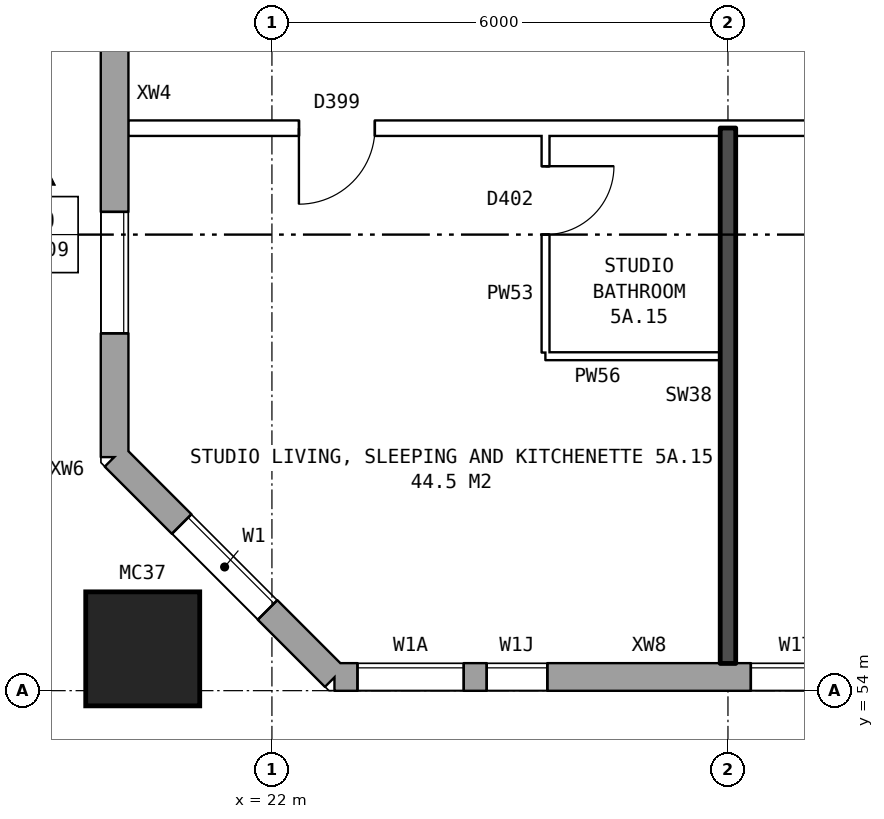
"""IFC4 building model, lengths in metres.
Left out: names, types, materials, properties, quantities, classifications, styles, units other than length and angle.
Written with IfcOpenShell. Run it as: python <this file> out.ifc"""

import sys

from ifc_helpers import new_model, si_unit, direction, frame, frame_2d, origin, origin_2d, place, context, subcontext, project, spatial, rectangle, hollow_rectangle, extrude, element, fill, save


model = new_model("IFC4")
c1 = context("Model", 3, precision=1e-05, world=origin(), true_north=direction((0.0, 1.0)))
c2 = subcontext(c1, "Body", "Model", "MODEL_VIEW")
j1 = project(units=[si_unit("LENGTHUNIT", "METRE"), si_unit("PLANEANGLEUNIT", "RADIAN")], contexts=[c1])
p1 = place(None, origin())
s1 = spatial("IfcSite", under=j1, at=p1, CompositionType="ELEMENT")
p2 = place(p1, origin())
s2 = spatial("IfcBuilding", under=s1, at=p2, CompositionType="ELEMENT")
p3 = place(p2, frame((0.0, 0.0, 22.6)))
s3 = spatial("IfcBuildingStorey", under=s2, at=p3, CompositionType="ELEMENT", Elevation=22.6)
p4 = place(p3, frame((20.3, 54.55, 0.0), z_axis=(0.0, 0.0, 1.0), x_axis=(1.0, 0.0, 0.0)))
e1 = element("IfcColumn", 1, at=p4, inside=s3, PredefinedType="COLUMN", context=c2, shape_type="SweptSolid", body=[
    extrude(hollow_rectangle(XDim=1.5, YDim=1.5, WallThickness=0.08, at=origin_2d()), origin(), (0.0, 0.0, 1.0), 3.1),
])
p5 = place(p3, frame((19.93, 57.075, 0.0), z_axis=(0.0, 0.0, 1.0), x_axis=(0.707106781187, -0.707106781187, 0.0)))
e2 = element("IfcWall", 2, at=p5, inside=s3, PredefinedType="STANDARD", context=c2, shape_type="SweptSolid", body=[
    extrude(rectangle(XDim=4.094, YDim=0.36, at=frame_2d((2.047, 0.0))), origin(), (0.0, 0.0, 1.0), 2.85),
])
p6 = place(p5, frame((1.247, 0.0, 0.8)))
e3 = element("IfcOpeningElement", 3, at=p6, cuts=e2, PredefinedType="OPENING", context=c2, shape_type="SweptSolid", body=[
    extrude(rectangle(XDim=1.6, YDim=1.8, at=frame_2d((0.8, 0.9))), frame((0.0, 0.19, 0.0), z_axis=(0.0, -1.0, 0.0), x_axis=(1.0, 0.0, 0.0)), (0.0, 0.0, 1.0), 0.38),
])
p7 = place(p3, frame((22.825, 54.18, 0.0), z_axis=(0.0, 0.0, 1.0), x_axis=(1.0, 0.0, 0.0)))
e4 = element("IfcWall", 4, at=p7, inside=s3, PredefinedType="STANDARD", context=c2, shape_type="SweptSolid", body=[
    extrude(rectangle(XDim=50.101, YDim=0.36, at=frame_2d((25.05, 0.0))), origin(), (0.0, 0.0, 1.0), 2.85),
])
p8 = place(p7, frame((0.3, 0.0, 0.8)))
e5 = element("IfcOpeningElement", 5, at=p8, cuts=e4, PredefinedType="OPENING", context=c2, shape_type="SweptSolid", body=[
    extrude(rectangle(XDim=1.4, YDim=1.8, at=frame_2d((0.7, 0.9))), frame((0.0, 0.19, 0.0), z_axis=(0.0, -1.0, 0.0), x_axis=(1.0, 0.0, 0.0)), (0.0, 0.0, 1.0), 0.38),
])
p9 = place(p7, frame((5.475, 0.0, 0.8)))
e6 = element("IfcOpeningElement", 6, at=p9, cuts=e4, PredefinedType="OPENING", context=c2, shape_type="SweptSolid", body=[
    extrude(rectangle(XDim=1.2, YDim=0.9, at=frame_2d((0.6, 0.45))), frame((0.0, 0.19, 0.0), z_axis=(0.0, -1.0, 0.0), x_axis=(1.0, 0.0, 0.0)), (0.0, 0.0, 1.0), 0.38),
])
p10 = place(p7, frame((8.875, 0.0, 0.8)))
e7 = element("IfcOpeningElement", 7, at=p10, cuts=e4, PredefinedType="OPENING", context=c2, shape_type="SweptSolid", body=[
    extrude(rectangle(XDim=1.6, YDim=1.8, at=frame_2d((0.8, 0.9))), frame((0.0, 0.19, 0.0), z_axis=(0.0, -1.0, 0.0), x_axis=(1.0, 0.0, 0.0)), (0.0, 0.0, 1.0), 0.38),
])
p11 = place(p7, frame((11.875, 0.0, 0.8)))
e8 = element("IfcOpeningElement", 8, at=p11, cuts=e4, PredefinedType="OPENING", context=c2, shape_type="SweptSolid", body=[
    extrude(rectangle(XDim=1.6, YDim=1.8, at=frame_2d((0.8, 0.9))), frame((0.0, 0.19, 0.0), z_axis=(0.0, -1.0, 0.0), x_axis=(1.0, 0.0, 0.0)), (0.0, 0.0, 1.0), 0.38),
])
p12 = place(p7, frame((14.875, 0.0, 0.8)))
e9 = element("IfcOpeningElement", 9, at=p12, cuts=e4, PredefinedType="OPENING", context=c2, shape_type="SweptSolid", body=[
    extrude(rectangle(XDim=1.6, YDim=1.8, at=frame_2d((0.8, 0.9))), frame((0.0, 0.19, 0.0), z_axis=(0.0, -1.0, 0.0), x_axis=(1.0, 0.0, 0.0)), (0.0, 0.0, 1.0), 0.38),
])
p13 = place(p7, frame((17.875, 0.0, 0.8)))
e10 = element("IfcOpeningElement", 10, at=p13, cuts=e4, PredefinedType="OPENING", context=c2, shape_type="SweptSolid", body=[
    extrude(rectangle(XDim=1.6, YDim=1.8, at=frame_2d((0.8, 0.9))), frame((0.0, 0.19, 0.0), z_axis=(0.0, -1.0, 0.0), x_axis=(1.0, 0.0, 0.0)), (0.0, 0.0, 1.0), 0.38),
])
p14 = place(p7, frame((20.875, 0.0, 0.8)))
e11 = element("IfcOpeningElement", 11, at=p14, cuts=e4, PredefinedType="OPENING", context=c2, shape_type="SweptSolid", body=[
    extrude(rectangle(XDim=1.6, YDim=1.8, at=frame_2d((0.8, 0.9))), frame((0.0, 0.19, 0.0), z_axis=(0.0, -1.0, 0.0), x_axis=(1.0, 0.0, 0.0)), (0.0, 0.0, 1.0), 0.38),
])
p15 = place(p7, frame((23.875, 0.0, 0.8)))
e12 = element("IfcOpeningElement", 12, at=p15, cuts=e4, PredefinedType="OPENING", context=c2, shape_type="SweptSolid", body=[
    extrude(rectangle(XDim=1.6, YDim=1.8, at=frame_2d((0.8, 0.9))), frame((0.0, 0.19, 0.0), z_axis=(0.0, -1.0, 0.0), x_axis=(1.0, 0.0, 0.0)), (0.0, 0.0, 1.0), 0.38),
])
p16 = place(p7, frame((26.875, 0.0, 0.8)))
e13 = element("IfcOpeningElement", 13, at=p16, cuts=e4, PredefinedType="OPENING", context=c2, shape_type="SweptSolid", body=[
    extrude(rectangle(XDim=1.6, YDim=1.8, at=frame_2d((0.8, 0.9))), frame((0.0, 0.19, 0.0), z_axis=(0.0, -1.0, 0.0), x_axis=(1.0, 0.0, 0.0)), (0.0, 0.0, 1.0), 0.38),
])
p17 = place(p7, frame((29.875, 0.0, 0.8)))
e14 = element("IfcOpeningElement", 14, at=p17, cuts=e4, PredefinedType="OPENING", context=c2, shape_type="SweptSolid", body=[
    extrude(rectangle(XDim=1.6, YDim=1.8, at=frame_2d((0.8, 0.9))), frame((0.0, 0.19, 0.0), z_axis=(0.0, -1.0, 0.0), x_axis=(1.0, 0.0, 0.0)), (0.0, 0.0, 1.0), 0.38),
])
p18 = place(p7, frame((32.875, 0.0, 0.8)))
e15 = element("IfcOpeningElement", 15, at=p18, cuts=e4, PredefinedType="OPENING", context=c2, shape_type="SweptSolid", body=[
    extrude(rectangle(XDim=1.6, YDim=1.8, at=frame_2d((0.8, 0.9))), frame((0.0, 0.19, 0.0), z_axis=(0.0, -1.0, 0.0), x_axis=(1.0, 0.0, 0.0)), (0.0, 0.0, 1.0), 0.38),
])
p19 = place(p7, frame((35.875, 0.0, 0.8)))
e16 = element("IfcOpeningElement", 16, at=p19, cuts=e4, PredefinedType="OPENING", context=c2, shape_type="SweptSolid", body=[
    extrude(rectangle(XDim=1.6, YDim=1.8, at=frame_2d((0.8, 0.9))), frame((0.0, 0.19, 0.0), z_axis=(0.0, -1.0, 0.0), x_axis=(1.0, 0.0, 0.0)), (0.0, 0.0, 1.0), 0.38),
])
p20 = place(p7, frame((38.875, 0.0, 0.8)))
e17 = element("IfcOpeningElement", 17, at=p20, cuts=e4, PredefinedType="OPENING", context=c2, shape_type="SweptSolid", body=[
    extrude(rectangle(XDim=1.6, YDim=1.8, at=frame_2d((0.8, 0.9))), frame((0.0, 0.19, 0.0), z_axis=(0.0, -1.0, 0.0), x_axis=(1.0, 0.0, 0.0)), (0.0, 0.0, 1.0), 0.38),
])
p21 = place(p7, frame((41.875, 0.0, 0.8)))
e18 = element("IfcOpeningElement", 18, at=p21, cuts=e4, PredefinedType="OPENING", context=c2, shape_type="SweptSolid", body=[
    extrude(rectangle(XDim=1.6, YDim=1.8, at=frame_2d((0.8, 0.9))), frame((0.0, 0.19, 0.0), z_axis=(0.0, -1.0, 0.0), x_axis=(1.0, 0.0, 0.0)), (0.0, 0.0, 1.0), 0.38),
])
p22 = place(p7, frame((43.775, 0.0, 0.8)))
e19 = element("IfcOpeningElement", 19, at=p22, cuts=e4, PredefinedType="OPENING", context=c2, shape_type="SweptSolid", body=[
    extrude(rectangle(XDim=0.8, YDim=0.9, at=frame_2d((0.4, 0.45))), frame((0.0, 0.19, 0.0), z_axis=(0.0, -1.0, 0.0), x_axis=(1.0, 0.0, 0.0)), (0.0, 0.0, 1.0), 0.38),
])
p23 = place(p7, frame((47.875, 0.0, 0.8)))
e20 = element("IfcOpeningElement", 20, at=p23, cuts=e4, PredefinedType="OPENING", context=c2, shape_type="SweptSolid", body=[
    extrude(rectangle(XDim=1.6, YDim=1.8, at=frame_2d((0.8, 0.9))), frame((0.0, 0.19, 0.0), z_axis=(0.0, -1.0, 0.0), x_axis=(1.0, 0.0, 0.0)), (0.0, 0.0, 1.0), 0.38),
])
p24 = place(p7, frame((2.0, 0.0, 0.9)))
e21 = element("IfcOpeningElement", 21, at=p24, cuts=e4, PredefinedType="OPENING", context=c2, shape_type="SweptSolid", body=[
    extrude(rectangle(XDim=0.8, YDim=1.5, at=frame_2d((0.4, 0.75))), frame((0.0, 0.19, 0.0), z_axis=(0.0, -1.0, 0.0), x_axis=(1.0, 0.0, 0.0)), (0.0, 0.0, 1.0), 0.38),
])
p25 = place(p7, frame((6.975, 0.0, 0.8)))
e22 = element("IfcOpeningElement", 22, at=p25, cuts=e4, PredefinedType="OPENING", context=c2, shape_type="SweptSolid", body=[
    extrude(rectangle(XDim=1.4, YDim=1.8, at=frame_2d((0.7, 0.9))), frame((0.0, 0.19, 0.0), z_axis=(0.0, -1.0, 0.0), x_axis=(1.0, 0.0, 0.0)), (0.0, 0.0, 1.0), 0.38),
])
p26 = place(p7, frame((46.075, 0.0, 1.7)))
e23 = element("IfcOpeningElement", 23, at=p26, cuts=e4, PredefinedType="OPENING", context=c2, shape_type="SweptSolid", body=[
    extrude(rectangle(XDim=0.8, YDim=0.9, at=frame_2d((0.4, 0.45))), frame((0.0, 0.19, 0.0), z_axis=(0.0, -1.0, 0.0), x_axis=(1.0, 0.0, 0.0)), (0.0, 0.0, 1.0), 0.38),
])
p27 = place(p3, frame((19.93, 82.925, 0.0), z_axis=(0.0, 0.0, 1.0), x_axis=(0.0, -1.0, 0.0)))
e24 = element("IfcWall", 24, at=p27, inside=s3, PredefinedType="STANDARD", context=c2, shape_type="SweptSolid", body=[
    extrude(rectangle(XDim=25.851, YDim=0.36, at=frame_2d((12.925, 0.0))), origin(), (0.0, 0.0, 1.0), 2.85),
])
p28 = place(p27, frame((1.625, 0.0, 0.8)))
e25 = element("IfcOpeningElement", 25, at=p28, cuts=e24, PredefinedType="OPENING", context=c2, shape_type="SweptSolid", body=[
    extrude(rectangle(XDim=1.6, YDim=1.8, at=frame_2d((0.8, 0.9))), frame((0.0, 0.19, 0.0), z_axis=(0.0, -1.0, 0.0), x_axis=(1.0, 0.0, 0.0)), (0.0, 0.0, 1.0), 0.38),
])
p29 = place(p27, frame((6.225, 0.0, 0.8)))
e26 = element("IfcOpeningElement", 26, at=p29, cuts=e24, PredefinedType="OPENING", context=c2, shape_type="SweptSolid", body=[
    extrude(rectangle(XDim=1.0, YDim=0.9, at=frame_2d((0.5, 0.45))), frame((0.0, 0.19, 0.0), z_axis=(0.0, -1.0, 0.0), x_axis=(1.0, 0.0, 0.0)), (0.0, 0.0, 1.0), 0.38),
])
p30 = place(p27, frame((7.625, 0.0, 0.8)))
e27 = element("IfcOpeningElement", 27, at=p30, cuts=e24, PredefinedType="OPENING", context=c2, shape_type="SweptSolid", body=[
    extrude(rectangle(XDim=1.6, YDim=1.8, at=frame_2d((0.8, 0.9))), frame((0.0, 0.19, 0.0), z_axis=(0.0, -1.0, 0.0), x_axis=(1.0, 0.0, 0.0)), (0.0, 0.0, 1.0), 0.38),
])
p31 = place(p27, frame((10.625, 0.0, 0.8)))
e28 = element("IfcOpeningElement", 28, at=p31, cuts=e24, PredefinedType="OPENING", context=c2, shape_type="SweptSolid", body=[
    extrude(rectangle(XDim=1.6, YDim=1.8, at=frame_2d((0.8, 0.9))), frame((0.0, 0.19, 0.0), z_axis=(0.0, -1.0, 0.0), x_axis=(1.0, 0.0, 0.0)), (0.0, 0.0, 1.0), 0.38),
])
p32 = place(p27, frame((13.625, 0.0, 0.8)))
e29 = element("IfcOpeningElement", 29, at=p32, cuts=e24, PredefinedType="OPENING", context=c2, shape_type="SweptSolid", body=[
    extrude(rectangle(XDim=1.6, YDim=1.8, at=frame_2d((0.8, 0.9))), frame((0.0, 0.19, 0.0), z_axis=(0.0, -1.0, 0.0), x_axis=(1.0, 0.0, 0.0)), (0.0, 0.0, 1.0), 0.38),
])
p33 = place(p27, frame((16.625, 0.0, 0.8)))
e30 = element("IfcOpeningElement", 30, at=p33, cuts=e24, PredefinedType="OPENING", context=c2, shape_type="SweptSolid", body=[
    extrude(rectangle(XDim=1.6, YDim=1.8, at=frame_2d((0.8, 0.9))), frame((0.0, 0.19, 0.0), z_axis=(0.0, -1.0, 0.0), x_axis=(1.0, 0.0, 0.0)), (0.0, 0.0, 1.0), 0.38),
])
p34 = place(p27, frame((9.525, 0.0, 0.8)))
e31 = element("IfcOpeningElement", 31, at=p34, cuts=e24, PredefinedType="OPENING", context=c2, shape_type="SweptSolid", body=[
    extrude(rectangle(XDim=0.8, YDim=1.8, at=frame_2d((0.4, 0.9))), frame((0.0, 0.19, 0.0), z_axis=(0.0, -1.0, 0.0), x_axis=(1.0, 0.0, 0.0)), (0.0, 0.0, 1.0), 0.38),
])
p35 = place(p27, frame((22.625, 0.0, 0.8)))
e32 = element("IfcOpeningElement", 32, at=p35, cuts=e24, PredefinedType="OPENING", context=c2, shape_type="SweptSolid", body=[
    extrude(rectangle(XDim=1.6, YDim=1.8, at=frame_2d((0.8, 0.9))), frame((0.0, 0.19, 0.0), z_axis=(0.0, -1.0, 0.0), x_axis=(1.0, 0.0, 0.0)), (0.0, 0.0, 1.0), 0.38),
])
p36 = place(p27, frame((12.525, 0.0, 0.8)))
e33 = element("IfcOpeningElement", 33, at=p36, cuts=e24, PredefinedType="OPENING", context=c2, shape_type="SweptSolid", body=[
    extrude(rectangle(XDim=0.8, YDim=1.8, at=frame_2d((0.4, 0.9))), frame((0.0, 0.19, 0.0), z_axis=(0.0, -1.0, 0.0), x_axis=(1.0, 0.0, 0.0)), (0.0, 0.0, 1.0), 0.38),
])
p37 = place(p27, frame((15.525, 0.0, 0.8)))
e34 = element("IfcOpeningElement", 34, at=p37, cuts=e24, PredefinedType="OPENING", context=c2, shape_type="SweptSolid", body=[
    extrude(rectangle(XDim=0.8, YDim=1.8, at=frame_2d((0.4, 0.9))), frame((0.0, 0.19, 0.0), z_axis=(0.0, -1.0, 0.0), x_axis=(1.0, 0.0, 0.0)), (0.0, 0.0, 1.0), 0.38),
])
p38 = place(p27, frame((18.525, 0.0, 0.8)))
e35 = element("IfcOpeningElement", 35, at=p38, cuts=e24, PredefinedType="OPENING", context=c2, shape_type="SweptSolid", body=[
    extrude(rectangle(XDim=1.0, YDim=0.9, at=frame_2d((0.5, 0.45))), frame((0.0, 0.19, 0.0), z_axis=(0.0, -1.0, 0.0), x_axis=(1.0, 0.0, 0.0)), (0.0, 0.0, 1.0), 0.38),
])
p39 = place(p3, frame((25.6, 58.4, 0.0), z_axis=(0.0, 0.0, 1.0), x_axis=(1.0, 0.0, 0.0)))
e36 = element("IfcWall", 36, at=p39, inside=s3, PredefinedType="PARTITIONING", context=c2, shape_type="SweptSolid", body=[
    extrude(rectangle(XDim=2.3, YDim=0.1, at=frame_2d((1.15, 0.0))), origin(), (0.0, 0.0, 1.0), 2.85),
])
p40 = place(p3, frame((20.11, 61.4, 0.0), z_axis=(0.0, 0.0, 1.0), x_axis=(1.0, 0.0, 0.0)))
e37 = element("IfcWall", 37, at=p40, inside=s3, PredefinedType="PARTITIONING", context=c2, shape_type="SweptSolid", body=[
    extrude(rectangle(XDim=25.79, YDim=0.2, at=frame_2d((12.895, 0.0))), origin(), (0.0, 0.0, 1.0), 2.85),
])
p41 = place(p40, frame((22.34, 0.0, 0.0)))
e38 = element("IfcOpeningElement", 38, at=p41, cuts=e37, PredefinedType="OPENING", context=c2, shape_type="SweptSolid", body=[
    extrude(rectangle(XDim=1.0, YDim=2.1, at=frame_2d((0.5, 1.05))), frame((0.0, 0.11, 0.0), z_axis=(0.0, -1.0, 0.0), x_axis=(1.0, 0.0, 0.0)), (0.0, 0.0, 1.0), 0.22),
])
p42 = place(p40, frame((10.39, 0.0, 0.0)))
e39 = element("IfcOpeningElement", 39, at=p42, cuts=e37, PredefinedType="OPENING", context=c2, shape_type="SweptSolid", body=[
    extrude(rectangle(XDim=1.0, YDim=2.1, at=frame_2d((0.5, 1.05))), frame((0.0, 0.11, 0.0), z_axis=(0.0, -1.0, 0.0), x_axis=(1.0, 0.0, 0.0)), (0.0, 0.0, 1.0), 0.22),
])
p43 = place(p40, frame((2.245, 0.0, 0.0)))
e40 = element("IfcOpeningElement", 40, at=p43, cuts=e37, PredefinedType="OPENING", context=c2, shape_type="SweptSolid", body=[
    extrude(rectangle(XDim=1.0, YDim=2.1, at=frame_2d((0.5, 1.05))), frame((0.0, 0.11, 0.0), z_axis=(0.0, -1.0, 0.0), x_axis=(1.0, 0.0, 0.0)), (0.0, 0.0, 1.0), 0.22),
])
p44 = place(p3, frame((25.6, 58.45, 0.0), z_axis=(0.0, 0.0, 1.0), x_axis=(0.0, 1.0, 0.0)))
e41 = element("IfcWall", 41, at=p44, inside=s3, PredefinedType="PARTITIONING", context=c2, shape_type="SweptSolid", body=[
    extrude(rectangle(XDim=2.85, YDim=0.1, at=frame_2d((1.425, 0.0))), origin(), (0.0, 0.0, 1.0), 2.85),
])
p45 = place(p44, frame((1.55, 0.0, 0.0)))
e42 = element("IfcOpeningElement", 42, at=p45, cuts=e41, PredefinedType="OPENING", context=c2, shape_type="SweptSolid", body=[
    extrude(rectangle(XDim=0.9, YDim=2.1, at=frame_2d((0.45, 1.05))), frame((0.0, 0.06, 0.0), z_axis=(0.0, -1.0, 0.0), x_axis=(1.0, 0.0, 0.0)), (0.0, 0.0, 1.0), 0.12),
])
p46 = place(p3, frame((28.0, 54.36, 0.0), z_axis=(0.0, 0.0, 1.0), x_axis=(0.0, 1.0, 0.0)))
e43 = element("IfcWall", 43, at=p46, inside=s3, PredefinedType="SOLIDWALL", context=c2, shape_type="SweptSolid", body=[
    extrude(rectangle(XDim=7.04, YDim=0.2, at=frame_2d((3.52, 0.0))), origin(), (0.0, 0.0, 1.0), 2.85),
])
p47 = place(p6, origin())
e44 = element("IfcWindow", 44, at=p47, inside=s3, PartitioningType="SINGLE_PANEL", PredefinedType="WINDOW", context=c2, shape_type="SweptSolid", body=[
    extrude(rectangle(XDim=1.6, YDim=1.8, at=frame_2d((0.8, 0.9))), frame((0.0, 0.15, 0.0), z_axis=(0.0, -1.0, 0.0), x_axis=(1.0, 0.0, 0.0)), (0.0, 0.0, 1.0), 0.06),
])
fill(e3, e44)
p48 = place(p8, origin())
e45 = element("IfcWindow", 45, at=p48, inside=s3, PartitioningType="SINGLE_PANEL", PredefinedType="WINDOW", context=c2, shape_type="SweptSolid", body=[
    extrude(rectangle(XDim=1.4, YDim=1.8, at=frame_2d((0.7, 0.9))), frame((0.0, 0.15, 0.0), z_axis=(0.0, -1.0, 0.0), x_axis=(1.0, 0.0, 0.0)), (0.0, 0.0, 1.0), 0.06),
])
fill(e5, e45)
p49 = place(p9, origin())
e46 = element("IfcWindow", 46, at=p49, inside=s3, PartitioningType="SINGLE_PANEL", PredefinedType="WINDOW", context=c2, shape_type="SweptSolid", body=[
    extrude(rectangle(XDim=1.2, YDim=0.9, at=frame_2d((0.6, 0.45))), frame((0.0, 0.15, 0.0), z_axis=(0.0, -1.0, 0.0), x_axis=(1.0, 0.0, 0.0)), (0.0, 0.0, 1.0), 0.06),
])
fill(e6, e46)
p50 = place(p35, origin())
e47 = element("IfcWindow", 47, at=p50, inside=s3, PartitioningType="SINGLE_PANEL", PredefinedType="WINDOW", context=c2, shape_type="SweptSolid", body=[
    extrude(rectangle(XDim=1.6, YDim=1.8, at=frame_2d((0.8, 0.9))), frame((0.0, 0.15, 0.0), z_axis=(0.0, -1.0, 0.0), x_axis=(1.0, 0.0, 0.0)), (0.0, 0.0, 1.0), 0.06),
])
fill(e32, e47)
p51 = place(p43, frame((1.0, 0.0, 0.0), z_axis=(0.0, 0.0, 1.0), x_axis=(-1.0, 0.0, 0.0)))
e48 = element("IfcDoor", 48, at=p51, inside=s3, OperationType="SINGLE_SWING_RIGHT", PredefinedType="DOOR", context=c2, shape_type="SweptSolid", body=[
    extrude(rectangle(XDim=1.0, YDim=2.1, at=frame_2d((0.5, 1.05))), frame((0.0, 0.025, 0.0), z_axis=(0.0, -1.0, 0.0), x_axis=(1.0, 0.0, 0.0)), (0.0, 0.0, 1.0), 0.05),
])
fill(e40, e48)
p52 = place(p45, frame((0.9, 0.0, 0.0), z_axis=(0.0, 0.0, 1.0), x_axis=(-1.0, 0.0, 0.0)))
e49 = element("IfcDoor", 49, at=p52, inside=s3, OperationType="SINGLE_SWING_LEFT", PredefinedType="DOOR", context=c2, shape_type="SweptSolid", body=[
    extrude(rectangle(XDim=0.9, YDim=2.1, at=frame_2d((0.45, 1.05))), frame((0.0, 0.025, 0.0), z_axis=(0.0, -1.0, 0.0), x_axis=(1.0, 0.0, 0.0)), (0.0, 0.0, 1.0), 0.05),
])
fill(e42, e49)
p53 = place(p24, origin())
e50 = element("IfcWindow", 50, at=p53, inside=s3, PartitioningType="SINGLE_PANEL", PredefinedType="WINDOW", context=c2, shape_type="SweptSolid", body=[
    extrude(rectangle(XDim=0.8, YDim=1.5, at=frame_2d((0.4, 0.75))), frame((0.0, 0.15, 0.0), z_axis=(0.0, -1.0, 0.0), x_axis=(1.0, 0.0, 0.0)), (0.0, 0.0, 1.0), 0.06),
])
fill(e21, e50)
save(model, sys.argv[1])
